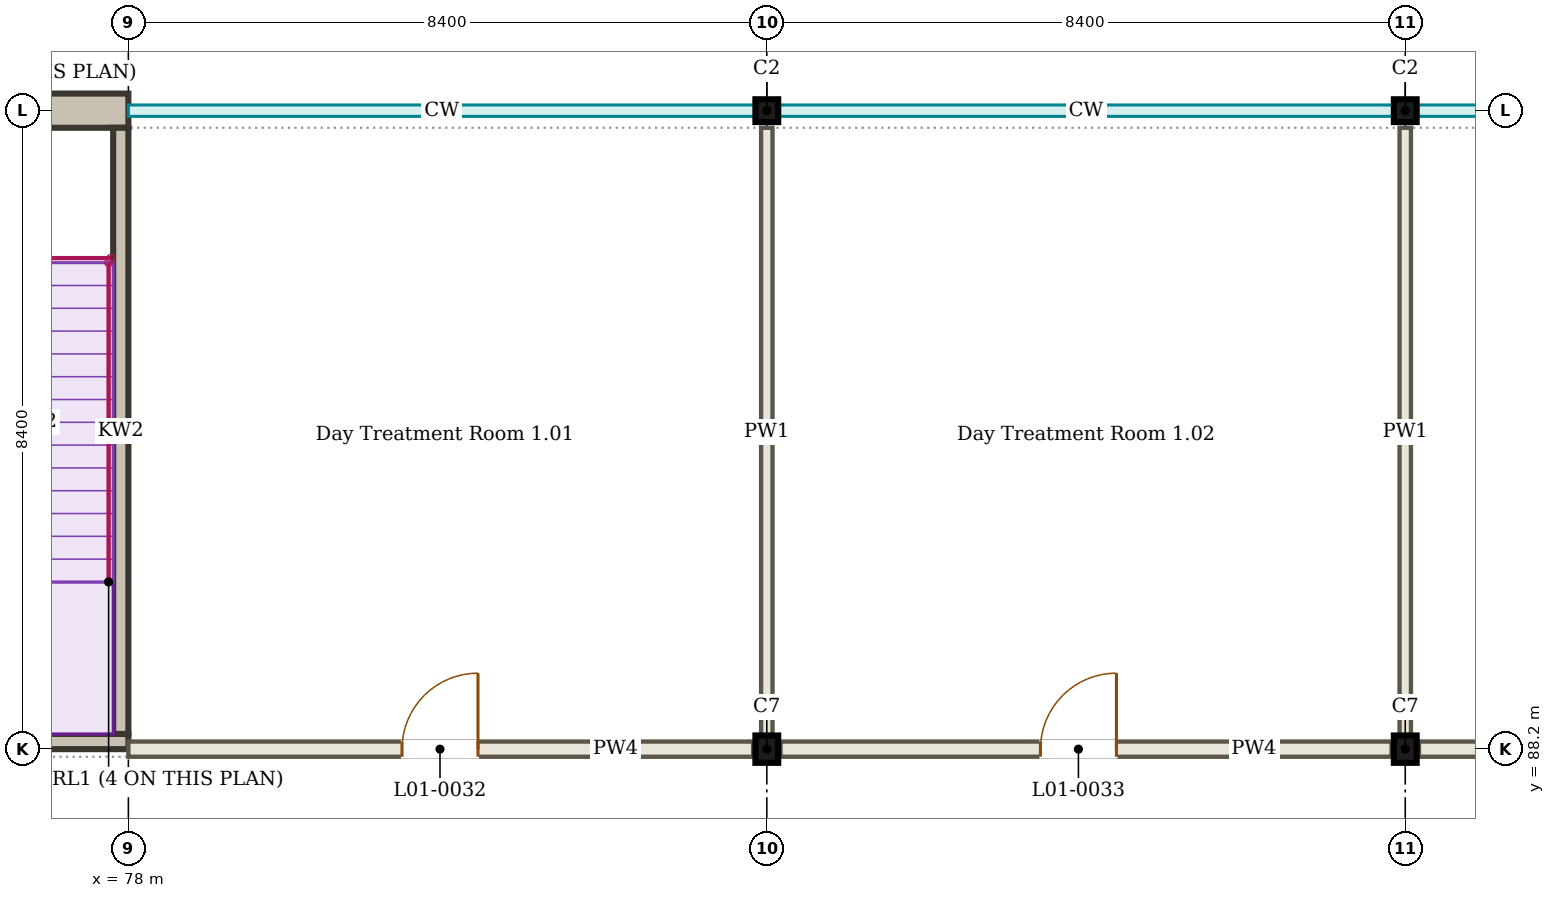
"""IFC4 building model, lengths in metres.
Left out: names, types, materials, properties, quantities, classifications, styles, units other than length and angle.
Written with IfcOpenShell. Run it as: python <this file> out.ifc"""

import sys

from ifc_helpers import new_model, si_unit, direction, frame, frame_2d, origin, origin_2d, place, context, subcontext, project, spatial, rectangle, i_section, extrude, element, fill, save


model = new_model("IFC4")
c1 = context("Model", 3, precision=1e-05, world=origin(), true_north=direction((0.0, 1.0)))
c2 = subcontext(c1, "Body", "Model", "MODEL_VIEW")
j1 = project(units=[si_unit("LENGTHUNIT", "METRE"), si_unit("PLANEANGLEUNIT", "RADIAN")], contexts=[c1])
p1 = place(None, origin())
s1 = spatial("IfcSite", under=j1, at=p1, CompositionType="ELEMENT")
p2 = place(p1, origin())
s2 = spatial("IfcBuilding", under=s1, at=p2, CompositionType="ELEMENT")
p3 = place(p2, frame((0.0, 0.0, 4.5)))
s3 = spatial("IfcBuildingStorey", under=s2, at=p3, CompositionType="ELEMENT", Elevation=4.5)
for number, where, z_axis, x_axis in (
    (1, (86.4, 88.2, 0.0), (0.0, 0.0, 1.0), (1.0, 0.0, 0.0)),
    (2, (94.8, 88.2, 0.0), (0.0, 0.0, 1.0), (1.0, 0.0, 0.0)),
):
    element("IfcColumn", number, at=place(p3, frame(where, z_axis=z_axis, x_axis=x_axis)), inside=s3, PredefinedType="COLUMN", context=c2, shape_type="SweptSolid", body=[
        extrude(i_section(OverallWidth=0.3, OverallDepth=0.36, WebThickness=0.012, FlangeThickness=0.022, FilletRadius=0.027, at=origin_2d()), origin(), (0.0, 0.0, 1.0), 4.5),
    ])
for number, where, z_axis, x_axis in (
    (3, (86.4, 96.6, 0.0), (0.0, 0.0, 1.0), (1.0, 0.0, 0.0)),
    (4, (94.8, 96.6, 0.0), (0.0, 0.0, 1.0), (1.0, 0.0, 0.0)),
):
    element("IfcColumn", number, at=place(p3, frame(where, z_axis=z_axis, x_axis=x_axis)), inside=s3, PredefinedType="COLUMN", context=c2, shape_type="SweptSolid", body=[
        extrude(i_section(OverallWidth=0.3, OverallDepth=0.3, WebThickness=0.011, FlangeThickness=0.019, FilletRadius=0.027, at=origin_2d()), origin(), (0.0, 0.0, 1.0), 4.5),
    ])
for number, where, z_axis, x_axis in (
    (5, (78.0, 96.76, 3.87), (0.0, 0.0, 1.0), (1.0, 0.0, 0.0)),
    (6, (86.55, 96.76, 3.87), (0.0, 0.0, 1.0), (1.0, 0.0, 0.0)),
):
    element("IfcWall", number, at=place(p3, frame(where, z_axis=z_axis, x_axis=x_axis)), inside=s3, PredefinedType="SOLIDWALL", context=c2, shape_type="SweptSolid", body=[
        extrude(rectangle(XDim=8.25, YDim=0.13, at=frame_2d((4.125, 0.0))), origin(), (0.0, 0.0, 1.0), 0.63),
    ])
p4 = place(p3, frame((78.0, 88.2, 0.0), z_axis=(0.0, 0.0, 1.0), x_axis=(1.0, 0.0, 0.0)))
e7 = element("IfcWall", 7, at=p4, inside=s3, PredefinedType="PARTITIONING", context=c2, shape_type="SweptSolid", body=[
    extrude(rectangle(XDim=8.22, YDim=0.2, at=frame_2d((4.11, 0.0))), origin(), (0.0, 0.0, 1.0), 3.8),
])
p5 = place(p4, frame((3.6, 0.0, 0.0)))
e8 = element("IfcOpeningElement", 8, at=p5, cuts=e7, PredefinedType="OPENING", context=c2, shape_type="SweptSolid", body=[
    extrude(rectangle(XDim=1.0, YDim=2.1, at=frame_2d((0.5, 1.05))), frame((0.0, 0.11, 0.0), z_axis=(0.0, -1.0, 0.0), x_axis=(1.0, 0.0, 0.0)), (0.0, 0.0, 1.0), 0.22),
])
p6 = place(p3, frame((86.58, 88.2, 0.0), z_axis=(0.0, 0.0, 1.0), x_axis=(1.0, 0.0, 0.0)))
e9 = element("IfcWall", 9, at=p6, inside=s3, PredefinedType="PARTITIONING", context=c2, shape_type="SweptSolid", body=[
    extrude(rectangle(XDim=8.04, YDim=0.2, at=frame_2d((4.02, 0.0))), origin(), (0.0, 0.0, 1.0), 3.8),
])
p7 = place(p6, frame((3.42, 0.0, 0.0)))
e10 = element("IfcOpeningElement", 10, at=p7, cuts=e9, PredefinedType="OPENING", context=c2, shape_type="SweptSolid", body=[
    extrude(rectangle(XDim=1.0, YDim=2.1, at=frame_2d((0.5, 1.05))), frame((0.0, 0.11, 0.0), z_axis=(0.0, -1.0, 0.0), x_axis=(1.0, 0.0, 0.0)), (0.0, 0.0, 1.0), 0.22),
])
p8 = place(p3, frame((94.98, 88.2, 0.0), z_axis=(0.0, 0.0, 1.0), x_axis=(1.0, 0.0, 0.0)))
e11 = element("IfcWall", 11, at=p8, inside=s3, PredefinedType="PARTITIONING", context=c2, shape_type="SweptSolid", body=[
    extrude(rectangle(XDim=8.22, YDim=0.2, at=frame_2d((4.11, 0.0))), origin(), (0.0, 0.0, 1.0), 3.8),
])
p9 = place(p8, frame((3.42, 0.0, 0.0)))
e12 = element("IfcOpeningElement", 12, at=p9, cuts=e11, PredefinedType="OPENING", context=c2, shape_type="SweptSolid", body=[
    extrude(rectangle(XDim=1.0, YDim=2.1, at=frame_2d((0.5, 1.05))), frame((0.0, 0.11, 0.0), z_axis=(0.0, -1.0, 0.0), x_axis=(1.0, 0.0, 0.0)), (0.0, 0.0, 1.0), 0.22),
])
for number, where, z_axis, x_axis in (
    (13, (86.4, 88.38, 0.0), (0.0, 0.0, 1.0), (0.0, 1.0, 0.0)),
    (14, (94.8, 88.38, 0.0), (0.0, 0.0, 1.0), (0.0, 1.0, 0.0)),
):
    element("IfcWall", number, at=place(p3, frame(where, z_axis=z_axis, x_axis=x_axis)), inside=s3, PredefinedType="PARTITIONING", context=c2, shape_type="SweptSolid", body=[
        extrude(rectangle(XDim=7.995, YDim=0.15, at=frame_2d((3.998, 0.0))), origin(), (0.0, 0.0, 1.0), 3.8),
    ])
p10 = place(p3, frame((78.0, 88.3, 0.0), z_axis=(0.0, 0.0, 1.0), x_axis=(-1.0, 0.0, 0.0)))
e15 = element("IfcWall", 15, at=p10, inside=s3, PredefinedType="SOLIDWALL", context=c2, shape_type="SweptSolid", body=[
    extrude(rectangle(XDim=8.4, YDim=0.2, at=frame_2d((4.2, 0.0))), origin(), (0.0, 0.0, 1.0), 4.5),
])
p11 = place(p10, frame((4.725, 0.0, 0.0)))
e16 = element("IfcOpeningElement", 16, at=p11, cuts=e15, PredefinedType="OPENING", context=c2, shape_type="SweptSolid", body=[
    extrude(rectangle(XDim=1.3, YDim=2.1, at=frame_2d((0.65, 1.05))), frame((0.0, 0.11, 0.0), z_axis=(0.0, -1.0, 0.0), x_axis=(1.0, 0.0, 0.0)), (0.0, 0.0, 1.0), 0.22),
])
p12 = place(p3, frame((78.0, 96.6, 0.0), z_axis=(0.0, 0.0, 1.0), x_axis=(-1.0, 0.0, 0.0)))
e17 = element("IfcWall", 17, at=p12, inside=s3, PredefinedType="SOLIDWALL", context=c2, shape_type="SweptSolid", body=[
    extrude(rectangle(XDim=8.4, YDim=0.45, at=frame_2d((4.2, 0.0))), origin(), (0.0, 0.0, 1.0), 4.5),
])
p13 = place(p3, frame((77.9, 88.4, 0.0), z_axis=(0.0, 0.0, 1.0), x_axis=(0.0, 1.0, 0.0)))
e18 = element("IfcWall", 18, at=p13, inside=s3, PredefinedType="SOLIDWALL", context=c2, shape_type="SweptSolid", body=[
    extrude(rectangle(XDim=7.975, YDim=0.2, at=frame_2d((3.988, 0.0))), origin(), (0.0, 0.0, 1.0), 4.5),
])
p14 = place(p5, origin())
e19 = element("IfcDoor", 19, at=p14, inside=s3, OperationType="SINGLE_SWING_RIGHT", PredefinedType="DOOR", context=c2, shape_type="SweptSolid", body=[
    extrude(rectangle(XDim=1.0, YDim=2.1, at=frame_2d((0.5, 1.05))), frame((0.0, 0.025, 0.0), z_axis=(0.0, -1.0, 0.0), x_axis=(1.0, 0.0, 0.0)), (0.0, 0.0, 1.0), 0.05),
])
fill(e8, e19)
p15 = place(p7, origin())
e20 = element("IfcDoor", 20, at=p15, inside=s3, OperationType="SINGLE_SWING_RIGHT", PredefinedType="DOOR", context=c2, shape_type="SweptSolid", body=[
    extrude(rectangle(XDim=1.0, YDim=2.1, at=frame_2d((0.5, 1.05))), frame((0.0, 0.025, 0.0), z_axis=(0.0, -1.0, 0.0), x_axis=(1.0, 0.0, 0.0)), (0.0, 0.0, 1.0), 0.05),
])
fill(e10, e20)
save(model, sys.argv[1])
